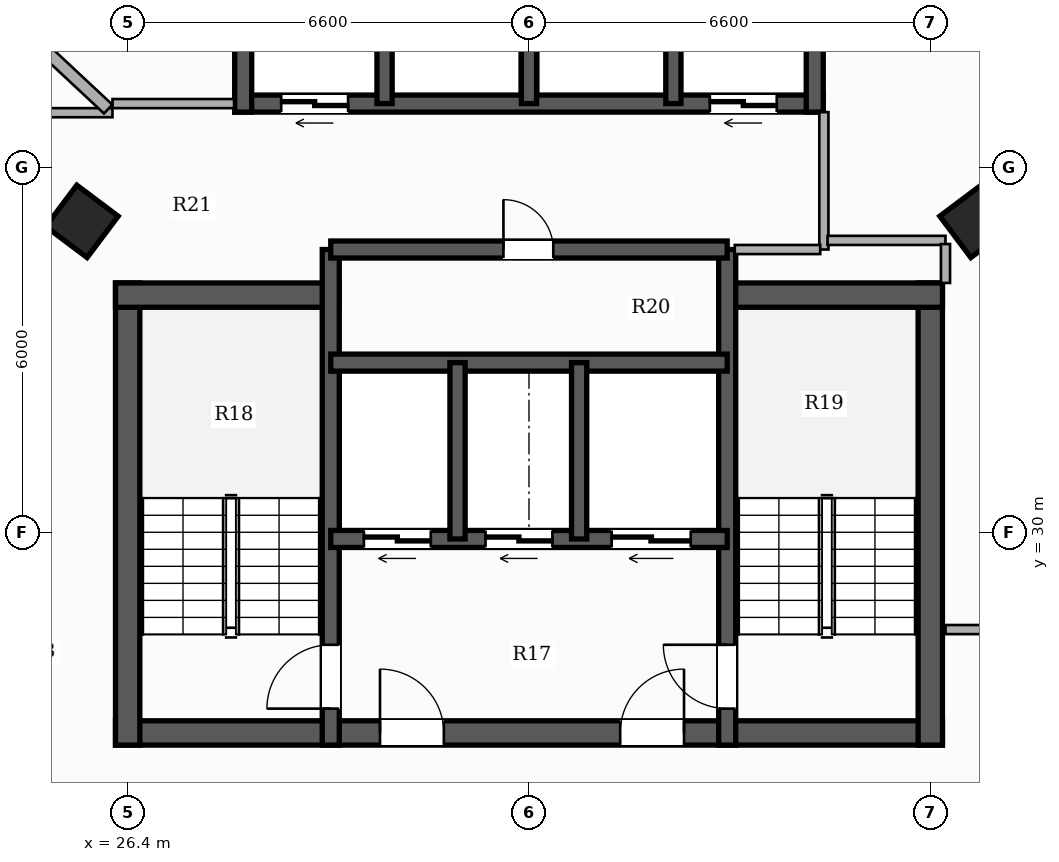
"""IFC4 building model, lengths in metres.
Left out: names, types, materials, properties, quantities, classifications, styles, units other than length and angle.
Written with IfcOpenShell. Run it as: python <this file> out.ifc"""

import sys

from ifc_helpers import new_model, si_unit, direction, frame, frame_2d, origin, origin_2d, place, context, subcontext, project, spatial, rectangle, hollow_rectangle, extrude, element, fill, save


model = new_model("IFC4")
c1 = context("Model", 3, precision=1e-05, world=origin(), true_north=direction((0.0, 1.0)))
c2 = subcontext(c1, "Body", "Model", "MODEL_VIEW")
j1 = project(units=[si_unit("LENGTHUNIT", "METRE"), si_unit("PLANEANGLEUNIT", "RADIAN")], contexts=[c1])
p1 = place(None, origin())
s1 = spatial("IfcSite", under=j1, at=p1, CompositionType="ELEMENT")
p2 = place(p1, origin())
s2 = spatial("IfcBuilding", under=s1, at=p2, CompositionType="ELEMENT")
p3 = place(p2, frame((0.0, 0.0, 136.4)))
s3 = spatial("IfcBuildingStorey", under=s2, at=p3, CompositionType="ELEMENT", Elevation=136.4)
p4 = place(p3, frame((26.2, 26.7, 0.0), z_axis=(0.0, 0.0, 1.0), x_axis=(1.0, 0.0, 0.0)))
e1 = element("IfcWall", 1, at=p4, inside=s3, PredefinedType="SHEAR", context=c2, shape_type="SweptSolid", body=[
    extrude(rectangle(XDim=13.6, YDim=0.4, at=frame_2d((6.8, 0.0))), origin(), (0.0, 0.0, 1.0), 3.3),
])
p5 = place(p4, frame((4.35, 0.0, 0.0)))
e2 = element("IfcOpeningElement", 2, at=p5, cuts=e1, PredefinedType="OPENING", context=c2, shape_type="SweptSolid", body=[
    extrude(rectangle(XDim=1.05, YDim=2.15, at=frame_2d((0.525, 1.075))), frame((0.0, 0.21, 0.0), z_axis=(0.0, -1.0, 0.0), x_axis=(1.0, 0.0, 0.0)), (0.0, 0.0, 1.0), 0.42),
])
p6 = place(p4, frame((8.3, 0.0, 0.0)))
e3 = element("IfcOpeningElement", 3, at=p6, cuts=e1, PredefinedType="OPENING", context=c2, shape_type="SweptSolid", body=[
    extrude(rectangle(XDim=1.05, YDim=2.15, at=frame_2d((0.525, 1.075))), frame((0.0, 0.21, 0.0), z_axis=(0.0, -1.0, 0.0), x_axis=(1.0, 0.0, 0.0)), (0.0, 0.0, 1.0), 0.42),
])
p7 = place(p3, frame((26.4, 26.5, 0.0), z_axis=(0.0, 0.0, 1.0), x_axis=(0.0, 1.0, 0.0)))
e4 = element("IfcWall", 4, at=p7, inside=s3, PredefinedType="SHEAR", context=c2, shape_type="SweptSolid", body=[
    extrude(rectangle(XDim=7.6, YDim=0.4, at=frame_2d((3.8, 0.0))), origin(), (0.0, 0.0, 1.0), 3.3),
])
p8 = place(p3, frame((26.2, 33.9, 0.0), z_axis=(0.0, 0.0, 1.0), x_axis=(1.0, 0.0, 0.0)))
e5 = element("IfcWall", 5, at=p8, inside=s3, PredefinedType="SHEAR", context=c2, shape_type="SweptSolid", body=[
    extrude(rectangle(XDim=3.68, YDim=0.4, at=frame_2d((1.84, 0.0))), origin(), (0.0, 0.0, 1.0), 3.3),
])
p9 = place(p3, frame((39.6, 26.5, 0.0), z_axis=(0.0, 0.0, 1.0), x_axis=(0.0, 1.0, 0.0)))
e6 = element("IfcWall", 6, at=p9, inside=s3, PredefinedType="SHEAR", context=c2, shape_type="SweptSolid", body=[
    extrude(rectangle(XDim=7.6, YDim=0.4, at=frame_2d((3.8, 0.0))), origin(), (0.0, 0.0, 1.0), 3.3),
])
p10 = place(p3, frame((36.12, 33.9, 0.0), z_axis=(0.0, 0.0, 1.0), x_axis=(1.0, 0.0, 0.0)))
e7 = element("IfcWall", 7, at=p10, inside=s3, PredefinedType="SHEAR", context=c2, shape_type="SweptSolid", body=[
    extrude(rectangle(XDim=3.68, YDim=0.4, at=frame_2d((1.84, 0.0))), origin(), (0.0, 0.0, 1.0), 3.3),
])
p11 = place(p3, frame((29.74, 26.5, 0.0), z_axis=(0.0, 0.0, 1.0), x_axis=(0.0, 1.0, 0.0)))
e8 = element("IfcWall", 8, at=p11, inside=s3, PredefinedType="SHEAR", context=c2, shape_type="SweptSolid", body=[
    extrude(rectangle(XDim=8.15, YDim=0.28, at=frame_2d((4.075, 0.0))), origin(), (0.0, 0.0, 1.0), 3.3),
])
p12 = place(p11, frame((0.6, 0.0, 0.0)))
e9 = element("IfcOpeningElement", 9, at=p12, cuts=e8, PredefinedType="OPENING", context=c2, shape_type="SweptSolid", body=[
    extrude(rectangle(XDim=1.05, YDim=2.15, at=frame_2d((0.525, 1.075))), frame((0.0, 0.15, 0.0), z_axis=(0.0, -1.0, 0.0), x_axis=(1.0, 0.0, 0.0)), (0.0, 0.0, 1.0), 0.3),
])
p13 = place(p3, frame((36.26, 26.5, 0.0), z_axis=(0.0, 0.0, 1.0), x_axis=(0.0, 1.0, 0.0)))
e10 = element("IfcWall", 10, at=p13, inside=s3, PredefinedType="SHEAR", context=c2, shape_type="SweptSolid", body=[
    extrude(rectangle(XDim=8.15, YDim=0.28, at=frame_2d((4.075, 0.0))), origin(), (0.0, 0.0, 1.0), 3.3),
])
p14 = place(p13, frame((0.6, 0.0, 0.0)))
e11 = element("IfcOpeningElement", 11, at=p14, cuts=e10, PredefinedType="OPENING", context=c2, shape_type="SweptSolid", body=[
    extrude(rectangle(XDim=1.05, YDim=2.15, at=frame_2d((0.525, 1.075))), frame((0.0, 0.15, 0.0), z_axis=(0.0, -1.0, 0.0), x_axis=(1.0, 0.0, 0.0)), (0.0, 0.0, 1.0), 0.3),
])
p15 = place(p3, frame((36.26, 29.89, 0.0), z_axis=(0.0, 0.0, 1.0), x_axis=(-1.0, 0.0, 0.0)))
e12 = element("IfcWall", 12, at=p15, inside=s3, PredefinedType="SHEAR", context=c2, shape_type="SweptSolid", body=[
    extrude(rectangle(XDim=6.52, YDim=0.28, at=frame_2d((3.26, 0.0))), origin(), (0.0, 0.0, 1.0), 3.3),
])
p16 = place(p15, frame((4.875, 0.0, 0.0)))
e13 = element("IfcOpeningElement", 13, at=p16, cuts=e12, PredefinedType="OPENING", context=c2, shape_type="SweptSolid", body=[
    extrude(rectangle(XDim=1.1, YDim=2.2, at=frame_2d((0.55, 1.1))), frame((0.0, 0.15, 0.0), z_axis=(0.0, -1.0, 0.0), x_axis=(1.0, 0.0, 0.0)), (0.0, 0.0, 1.0), 0.3),
])
p17 = place(p15, frame((2.875, 0.0, 0.0)))
e14 = element("IfcOpeningElement", 14, at=p17, cuts=e12, PredefinedType="OPENING", context=c2, shape_type="SweptSolid", body=[
    extrude(rectangle(XDim=1.1, YDim=2.2, at=frame_2d((0.55, 1.1))), frame((0.0, 0.15, 0.0), z_axis=(0.0, -1.0, 0.0), x_axis=(1.0, 0.0, 0.0)), (0.0, 0.0, 1.0), 0.3),
])
p18 = place(p15, frame((0.6, 0.0, 0.0)))
e15 = element("IfcOpeningElement", 15, at=p18, cuts=e12, PredefinedType="OPENING", context=c2, shape_type="SweptSolid", body=[
    extrude(rectangle(XDim=1.3, YDim=2.2, at=frame_2d((0.65, 1.1))), frame((0.0, 0.15, 0.0), z_axis=(0.0, -1.0, 0.0), x_axis=(1.0, 0.0, 0.0)), (0.0, 0.0, 1.0), 0.3),
])
p19 = place(p3, frame((29.74, 32.79, 0.0), z_axis=(0.0, 0.0, 1.0), x_axis=(1.0, 0.0, 0.0)))
e16 = element("IfcWall", 16, at=p19, inside=s3, PredefinedType="SHEAR", context=c2, shape_type="SweptSolid", body=[
    extrude(rectangle(XDim=6.52, YDim=0.28, at=frame_2d((3.26, 0.0))), origin(), (0.0, 0.0, 1.0), 3.3),
])
for number, where, z_axis, x_axis in (
    (17, (31.825, 29.89, 0.0), (0.0, 0.0, 1.0), (0.0, 1.0, 0.0)),
    (18, (33.825, 29.89, 0.0), (0.0, 0.0, 1.0), (0.0, 1.0, 0.0)),
):
    element("IfcWall", number, at=place(p3, frame(where, z_axis=z_axis, x_axis=x_axis)), inside=s3, PredefinedType="SHEAR", context=c2, shape_type="SweptSolid", body=[
        extrude(rectangle(XDim=2.9, YDim=0.25, at=frame_2d((1.45, 0.0))), origin(), (0.0, 0.0, 1.0), 3.3),
    ])
p20 = place(p3, frame((29.74, 34.65, 0.0), z_axis=(0.0, 0.0, 1.0), x_axis=(1.0, 0.0, 0.0)))
e19 = element("IfcWall", 19, at=p20, inside=s3, PredefinedType="SHEAR", context=c2, shape_type="SweptSolid", body=[
    extrude(rectangle(XDim=6.52, YDim=0.28, at=frame_2d((3.26, 0.0))), origin(), (0.0, 0.0, 1.0), 3.3),
])
p21 = place(p20, frame((2.84, 0.0, 0.0)))
e20 = element("IfcOpeningElement", 20, at=p21, cuts=e19, PredefinedType="OPENING", context=c2, shape_type="SweptSolid", body=[
    extrude(rectangle(XDim=0.82, YDim=2.1, at=frame_2d((0.41, 1.05))), frame((0.0, 0.15, 0.0), z_axis=(0.0, -1.0, 0.0), x_axis=(1.0, 0.0, 0.0)), (0.0, 0.0, 1.0), 0.3),
])
p22 = place(p3, frame((37.84, 37.05, 0.0), z_axis=(0.0, 0.0, 1.0), x_axis=(-1.0, 0.0, 0.0)))
e21 = element("IfcWall", 21, at=p22, inside=s3, PredefinedType="SHEAR", context=c2, shape_type="SweptSolid", body=[
    extrude(rectangle(XDim=9.68, YDim=0.28, at=frame_2d((4.84, 0.0))), origin(), (0.0, 0.0, 1.0), 3.3),
])
p23 = place(p22, frame((7.815, 0.0, 0.0)))
e22 = element("IfcOpeningElement", 22, at=p23, cuts=e21, PredefinedType="OPENING", context=c2, shape_type="SweptSolid", body=[
    extrude(rectangle(XDim=1.1, YDim=2.2, at=frame_2d((0.55, 1.1))), frame((0.0, 0.15, 0.0), z_axis=(0.0, -1.0, 0.0), x_axis=(1.0, 0.0, 0.0)), (0.0, 0.0, 1.0), 0.3),
])
p24 = place(p22, frame((0.765, 0.0, 0.0)))
e23 = element("IfcOpeningElement", 23, at=p24, cuts=e21, PredefinedType="OPENING", context=c2, shape_type="SweptSolid", body=[
    extrude(rectangle(XDim=1.1, YDim=2.2, at=frame_2d((0.55, 1.1))), frame((0.0, 0.15, 0.0), z_axis=(0.0, -1.0, 0.0), x_axis=(1.0, 0.0, 0.0)), (0.0, 0.0, 1.0), 0.3),
])
for number, where, z_axis, x_axis in (
    (24, (28.3, 36.91, 0.0), (0.0, 0.0, 1.0), (0.0, 1.0, 0.0)),
    (25, (37.7, 36.91, 0.0), (0.0, 0.0, 1.0), (0.0, 1.0, 0.0)),
):
    element("IfcWall", number, at=place(p3, frame(where, z_axis=z_axis, x_axis=x_axis)), inside=s3, PredefinedType="SHEAR", context=c2, shape_type="SweptSolid", body=[
        extrude(rectangle(XDim=2.83, YDim=0.28, at=frame_2d((1.415, 0.0))), origin(), (0.0, 0.0, 1.0), 3.3),
    ])
for number, where, z_axis, x_axis in (
    (26, (30.625, 37.05, 0.0), (0.0, 0.0, 1.0), (0.0, 1.0, 0.0)),
    (27, (33.0, 37.05, 0.0), (0.0, 0.0, 1.0), (0.0, 1.0, 0.0)),
    (28, (35.375, 37.05, 0.0), (0.0, 0.0, 1.0), (0.0, 1.0, 0.0)),
):
    element("IfcWall", number, at=place(p3, frame(where, z_axis=z_axis, x_axis=x_axis)), inside=s3, PredefinedType="SHEAR", context=c2, shape_type="SweptSolid", body=[
        extrude(rectangle(XDim=2.55, YDim=0.25, at=frame_2d((1.275, 0.0))), origin(), (0.0, 0.0, 1.0), 3.3),
    ])
for number, where, z_axis, x_axis in (
    (29, (25.648, 35.113, 0.0), (0.0, 0.0, 1.0), (0.6, 0.8, 0.0)),
    (30, (40.352, 35.113, 0.0), (0.0, 0.0, 1.0), (-0.6, 0.8, 0.0)),
):
    element("IfcColumn", number, at=place(p3, frame(where, z_axis=z_axis, x_axis=x_axis)), inside=s3, PredefinedType="COLUMN", context=c2, shape_type="SweptSolid", body=[
        extrude(hollow_rectangle(XDim=0.85, YDim=0.85, WallThickness=0.028, at=origin_2d()), origin(), (0.0, 0.0, 1.0), 3.3),
    ])
p25 = place(p3, frame((37.85, 34.65, 0.0), z_axis=(0.0, 0.0, 1.0), x_axis=(0.0, 1.0, 0.0)))
e31 = element("IfcWall", 31, at=p25, inside=s3, PredefinedType="PARTITIONING", context=c2, shape_type="SweptSolid", body=[
    extrude(rectangle(XDim=2.26, YDim=0.15, at=frame_2d((1.13, 0.0))), origin(), (0.0, 0.0, 1.0), 3.06),
])
p26 = place(p3, frame((36.385, 34.65, 0.0), z_axis=(0.0, 0.0, 1.0), x_axis=(1.0, 0.0, 0.0)))
e32 = element("IfcWall", 32, at=p26, inside=s3, PredefinedType="PARTITIONING", context=c2, shape_type="SweptSolid", body=[
    extrude(rectangle(XDim=1.405, YDim=0.15, at=frame_2d((0.703, 0.0))), origin(), (0.0, 0.0, 1.0), 2.425),
])
p27 = place(p3, frame((23.56, 36.9, 0.0), z_axis=(0.0, 0.0, 1.0), x_axis=(1.0, 0.0, 0.0)))
e33 = element("IfcWall", 33, at=p27, inside=s3, PredefinedType="PARTITIONING", context=c2, shape_type="SweptSolid", body=[
    extrude(rectangle(XDim=2.59, YDim=0.15, at=frame_2d((1.295, 0.0))), origin(), (0.0, 0.0, 1.0), 2.413),
])
p28 = place(p3, frame((39.85, 28.4, 0.0), z_axis=(0.0, 0.0, 1.0), x_axis=(1.0, 0.0, 0.0)))
e34 = element("IfcWall", 34, at=p28, inside=s3, PredefinedType="PARTITIONING", context=c2, shape_type="SweptSolid", body=[
    extrude(rectangle(XDim=2.5, YDim=0.15, at=frame_2d((1.25, 0.0))), origin(), (0.0, 0.0, 1.0), 2.721),
])
p29 = place(p3, frame((26.15, 37.05, 0.0), z_axis=(0.0, 0.0, 1.0), x_axis=(1.0, 0.0, 0.0)))
e35 = element("IfcWall", 35, at=p29, inside=s3, PredefinedType="PARTITIONING", context=c2, shape_type="SweptSolid", body=[
    extrude(rectangle(XDim=2.0, YDim=0.15, at=frame_2d((1.0, 0.0))), origin(), (0.0, 0.0, 1.0), 2.413),
])
p30 = place(p3, frame((37.91, 34.8, 0.0), z_axis=(0.0, 0.0, 1.0), x_axis=(1.0, 0.0, 0.0)))
e36 = element("IfcWall", 36, at=p30, inside=s3, PredefinedType="PARTITIONING", context=c2, shape_type="SweptSolid", body=[
    extrude(rectangle(XDim=1.94, YDim=0.15, at=frame_2d((0.97, 0.0))), origin(), (0.0, 0.0, 1.0), 2.721),
])
p31 = place(p3, frame((39.85, 34.74, 0.0), z_axis=(0.0, 0.0, 1.0), x_axis=(0.0, -1.0, 0.0)))
e37 = element("IfcWall", 37, at=p31, inside=s3, PredefinedType="PARTITIONING", context=c2, shape_type="SweptSolid", body=[
    extrude(rectangle(XDim=0.64, YDim=0.15, at=frame_2d((0.32, 0.0))), origin(), (0.0, 0.0, 1.0), 2.721),
])
p32 = place(p3, frame((26.079, 36.96, 0.0), z_axis=(0.0, 0.0, 1.0), x_axis=(-0.730912649308, 0.682471024354, 0.0)))
e38 = element("IfcWall", 38, at=p32, inside=s3, PredefinedType="PARTITIONING", context=c2, shape_type="SweptSolid", body=[
    extrude(rectangle(XDim=3.074, YDim=0.2, at=frame_2d((1.537, 0.0))), origin(), (0.0, 0.0, 1.0), 2.413),
])
p33 = place(p12, origin())
e39 = element("IfcDoor", 39, at=p33, inside=s3, OperationType="SINGLE_SWING_LEFT", PredefinedType="DOOR", context=c2, shape_type="SweptSolid", body=[
    extrude(rectangle(XDim=1.05, YDim=2.15, at=frame_2d((0.525, 1.075))), frame((0.0, 0.025, 0.0), z_axis=(0.0, -1.0, 0.0), x_axis=(1.0, 0.0, 0.0)), (0.0, 0.0, 1.0), 0.05),
])
fill(e9, e39)
p34 = place(p14, origin())
e40 = element("IfcDoor", 40, at=p34, inside=s3, OperationType="SINGLE_SWING_RIGHT", PredefinedType="DOOR", context=c2, shape_type="SweptSolid", body=[
    extrude(rectangle(XDim=1.05, YDim=2.15, at=frame_2d((0.525, 1.075))), frame((0.0, 0.025, 0.0), z_axis=(0.0, -1.0, 0.0), x_axis=(1.0, 0.0, 0.0)), (0.0, 0.0, 1.0), 0.05),
])
fill(e11, e40)
p35 = place(p5, origin())
e41 = element("IfcDoor", 41, at=p35, inside=s3, OperationType="SINGLE_SWING_LEFT", PredefinedType="DOOR", context=c2, shape_type="SweptSolid", body=[
    extrude(rectangle(XDim=1.05, YDim=2.15, at=frame_2d((0.525, 1.075))), frame((0.0, 0.025, 0.0), z_axis=(0.0, -1.0, 0.0), x_axis=(1.0, 0.0, 0.0)), (0.0, 0.0, 1.0), 0.05),
])
fill(e2, e41)
p36 = place(p6, origin())
e42 = element("IfcDoor", 42, at=p36, inside=s3, OperationType="SINGLE_SWING_RIGHT", PredefinedType="DOOR", context=c2, shape_type="SweptSolid", body=[
    extrude(rectangle(XDim=1.05, YDim=2.15, at=frame_2d((0.525, 1.075))), frame((0.0, 0.025, 0.0), z_axis=(0.0, -1.0, 0.0), x_axis=(1.0, 0.0, 0.0)), (0.0, 0.0, 1.0), 0.05),
])
fill(e3, e42)
p37 = place(p16, origin())
e43 = element("IfcDoor", 43, at=p37, inside=s3, OperationType="DOUBLE_DOOR_SLIDING", PredefinedType="DOOR", context=c2, shape_type="SweptSolid", body=[
    extrude(rectangle(XDim=1.1, YDim=2.2, at=frame_2d((0.55, 1.1))), frame((0.0, 0.025, 0.0), z_axis=(0.0, -1.0, 0.0), x_axis=(1.0, 0.0, 0.0)), (0.0, 0.0, 1.0), 0.05),
])
fill(e13, e43)
p38 = place(p17, origin())
e44 = element("IfcDoor", 44, at=p38, inside=s3, OperationType="DOUBLE_DOOR_SLIDING", PredefinedType="DOOR", context=c2, shape_type="SweptSolid", body=[
    extrude(rectangle(XDim=1.1, YDim=2.2, at=frame_2d((0.55, 1.1))), frame((0.0, 0.025, 0.0), z_axis=(0.0, -1.0, 0.0), x_axis=(1.0, 0.0, 0.0)), (0.0, 0.0, 1.0), 0.05),
])
fill(e14, e44)
p39 = place(p18, origin())
e45 = element("IfcDoor", 45, at=p39, inside=s3, OperationType="DOUBLE_DOOR_SLIDING", PredefinedType="DOOR", context=c2, shape_type="SweptSolid", body=[
    extrude(rectangle(XDim=1.3, YDim=2.2, at=frame_2d((0.65, 1.1))), frame((0.0, 0.025, 0.0), z_axis=(0.0, -1.0, 0.0), x_axis=(1.0, 0.0, 0.0)), (0.0, 0.0, 1.0), 0.05),
])
fill(e15, e45)
p40 = place(p23, origin())
e46 = element("IfcDoor", 46, at=p40, inside=s3, OperationType="DOUBLE_DOOR_SLIDING", PredefinedType="DOOR", context=c2, shape_type="SweptSolid", body=[
    extrude(rectangle(XDim=1.1, YDim=2.2, at=frame_2d((0.55, 1.1))), frame((0.0, 0.025, 0.0), z_axis=(0.0, -1.0, 0.0), x_axis=(1.0, 0.0, 0.0)), (0.0, 0.0, 1.0), 0.05),
])
fill(e22, e46)
p41 = place(p24, origin())
e47 = element("IfcDoor", 47, at=p41, inside=s3, OperationType="DOUBLE_DOOR_SLIDING", PredefinedType="DOOR", context=c2, shape_type="SweptSolid", body=[
    extrude(rectangle(XDim=1.1, YDim=2.2, at=frame_2d((0.55, 1.1))), frame((0.0, 0.025, 0.0), z_axis=(0.0, -1.0, 0.0), x_axis=(1.0, 0.0, 0.0)), (0.0, 0.0, 1.0), 0.05),
])
fill(e23, e47)
p42 = place(p21, origin())
e48 = element("IfcDoor", 48, at=p42, inside=s3, OperationType="SINGLE_SWING_LEFT", PredefinedType="DOOR", context=c2, shape_type="SweptSolid", body=[
    extrude(rectangle(XDim=0.82, YDim=2.1, at=frame_2d((0.41, 1.05))), frame((0.0, 0.025, 0.0), z_axis=(0.0, -1.0, 0.0), x_axis=(1.0, 0.0, 0.0)), (0.0, 0.0, 1.0), 0.05),
])
fill(e20, e48)
save(model, sys.argv[1])
